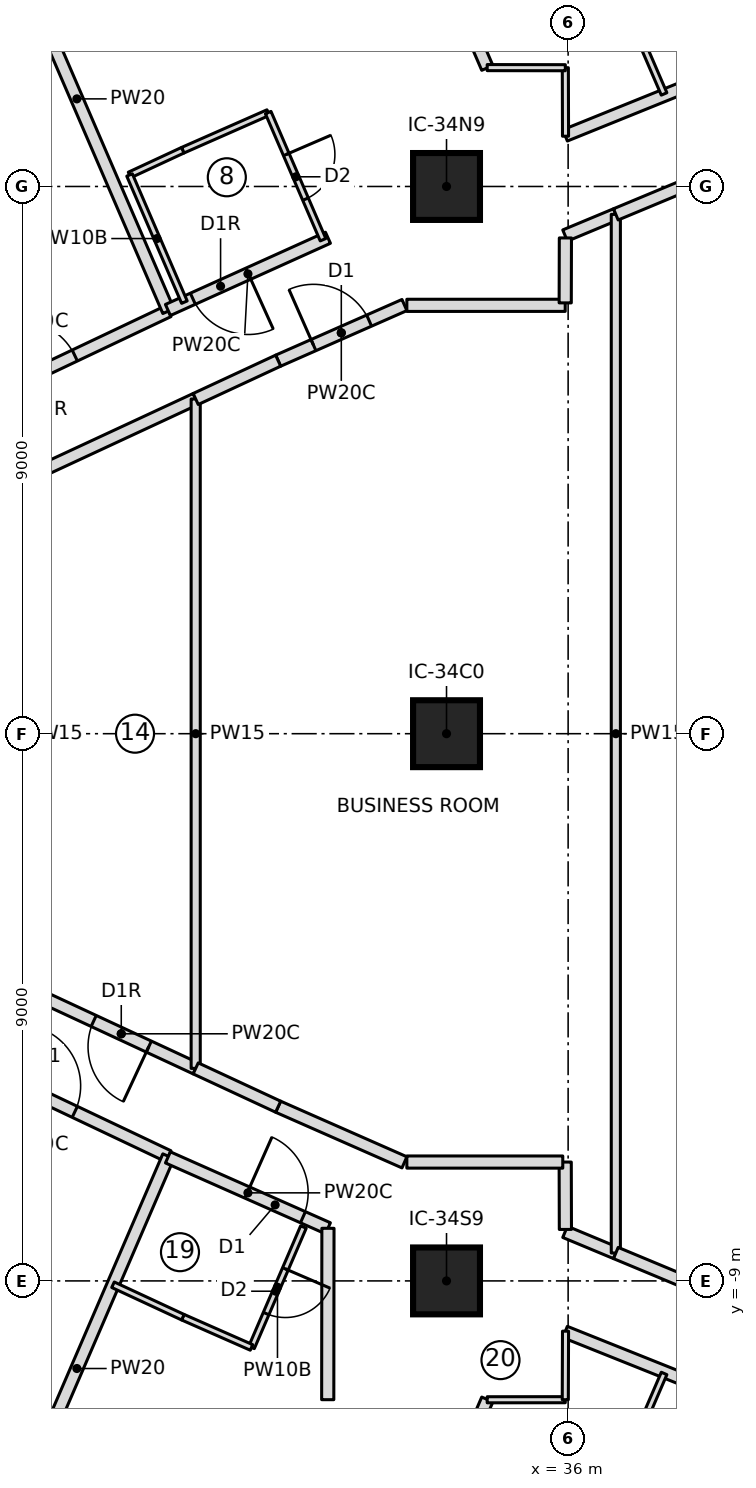
"""IFC4 building model, lengths in metres.
Left out: names, types, materials, properties, quantities, classifications, styles, units other than length and angle.
Written with IfcOpenShell. Run it as: python <this file> out.ifc"""

import sys

from ifc_helpers import new_model, si_unit, direction, frame, frame_2d, origin, origin_2d, place, context, subcontext, project, spatial, rectangle, extrude, element, fill, save


model = new_model("IFC4")
c1 = context("Model", 3, precision=1e-05, world=origin(), true_north=direction((0.0, 1.0)))
c2 = subcontext(c1, "Body", "Model", "MODEL_VIEW")
j1 = project(units=[si_unit("LENGTHUNIT", "METRE"), si_unit("PLANEANGLEUNIT", "RADIAN")], contexts=[c1])
p1 = place(None, origin())
s1 = spatial("IfcSite", under=j1, at=p1, CompositionType="ELEMENT")
p2 = place(p1, origin())
s2 = spatial("IfcBuilding", under=s1, at=p2, CompositionType="ELEMENT")
p3 = place(p2, frame((0.0, 0.0, 151.5)))
s3 = spatial("IfcBuildingStorey", under=s2, at=p3, CompositionType="ELEMENT", Elevation=151.5)
for number, where, z_axis, x_axis in (
    (1, (34.0, -9.0, 0.0), (0.0, 0.0, 1.0), (1.0, 0.0, 0.0)),
    (2, (34.0, 0.0, 0.0), (0.0, 0.0, 1.0), (1.0, 0.0, 0.0)),
    (3, (34.0, 9.0, 0.0), (0.0, 0.0, 1.0), (1.0, 0.0, 0.0)),
):
    element("IfcColumn", number, at=place(p3, frame(where, z_axis=z_axis, x_axis=x_axis)), inside=s3, PredefinedType="COLUMN", context=c2, shape_type="SweptSolid", body=[
        extrude(rectangle(XDim=1.1, YDim=1.1, at=origin_2d()), origin(), (0.0, 0.0, 1.0), 3.55),
    ])
p4 = place(p3, frame((23.64, 4.205, 0.0), z_axis=(0.0, 0.0, 1.0), x_axis=(0.90349162151, 0.428605751082, 0.0)))
e4 = element("IfcWall", 4, at=p4, inside=s3, PredefinedType="PARTITIONING", context=c2, shape_type="SweptSolid", body=[
    extrude(rectangle(XDim=6.404, YDim=0.2, at=frame_2d((3.202, 0.0))), origin(), (0.0, 0.0, 1.0), 3.25),
])
p5 = place(p4, frame((3.7, 0.0, 0.0)))
e5 = element("IfcOpeningElement", 5, at=p5, cuts=e4, PredefinedType="OPENING", context=c2, shape_type="SweptSolid", body=[
    extrude(rectangle(XDim=1.0, YDim=2.1, at=frame_2d((0.5, 1.05))), frame((0.0, 0.11, 0.0), z_axis=(0.0, -1.0, 0.0), x_axis=(1.0, 0.0, 0.0)), (0.0, 0.0, 1.0), 0.22),
])
p6 = place(p3, frame((29.426, 6.95, 0.0), z_axis=(0.0, 0.0, 1.0), x_axis=(-0.396007233012, 0.918247391176, 0.0)))
e6 = element("IfcWall", 6, at=p6, inside=s3, PredefinedType="PARTITIONING", context=c2, shape_type="SweptSolid", body=[
    extrude(rectangle(XDim=7.603, YDim=0.2, at=frame_2d((3.801, 0.0))), origin(), (0.0, 0.0, 1.0), 3.25),
])
p7 = place(p3, frame((32.05, 8.157, 0.0), z_axis=(0.0, 0.0, 1.0), x_axis=(-0.9114145851, -0.411489312215, 0.0)))
e7 = element("IfcWall", 7, at=p7, inside=s3, PredefinedType="PARTITIONING", context=c2, shape_type="SweptSolid", body=[
    extrude(rectangle(XDim=2.888, YDim=0.2, at=frame_2d((1.444, 0.0))), origin(), (0.0, 0.0, 1.0), 3.25),
])
p8 = place(p7, frame((1.438, 0.0, 0.0)))
e8 = element("IfcOpeningElement", 8, at=p8, cuts=e7, PredefinedType="OPENING", context=c2, shape_type="SweptSolid", body=[
    extrude(rectangle(XDim=1.0, YDim=2.1, at=frame_2d((0.5, 1.05))), frame((0.0, 0.11, 0.0), z_axis=(0.0, -1.0, 0.0), x_axis=(1.0, 0.0, 0.0)), (0.0, 0.0, 1.0), 0.22),
])
p9 = place(p3, frame((28.787, 9.189, 0.0), z_axis=(0.0, 0.0, 1.0), x_axis=(0.906840099005, 0.421474832982, 0.0)))
e9 = element("IfcWall", 9, at=p9, inside=s3, PredefinedType="PARTITIONING", context=c2, shape_type="SweptSolid", body=[
    extrude(rectangle(XDim=0.967, YDim=0.1, at=frame_2d((0.483, 0.0))), origin(), (0.0, 0.0, 1.0), 3.25),
])
p10 = place(p3, frame((29.664, 9.597, 0.0), z_axis=(0.0, 0.0, 1.0), x_axis=(0.915061287592, 0.403314814942, 0.0)))
e10 = element("IfcWall", 10, at=p10, inside=s3, PredefinedType="PARTITIONING", context=c2, shape_type="SweptSolid", body=[
    extrude(rectangle(XDim=1.533, YDim=0.1, at=frame_2d((0.767, 0.0))), origin(), (0.0, 0.0, 1.0), 3.25),
])
p11 = place(p3, frame((31.067, 10.215, 0.0), z_axis=(0.0, 0.0, 1.0), x_axis=(0.395975890988, -0.918260907235, 0.0)))
e11 = element("IfcWall", 11, at=p11, inside=s3, PredefinedType="PARTITIONING", context=c2, shape_type="SweptSolid", body=[
    extrude(rectangle(XDim=2.277, YDim=0.1, at=frame_2d((1.138, 0.0))), origin(), (0.0, 0.0, 1.0), 3.25),
])
p12 = place(p11, frame((0.75, 0.0, 0.0)))
e12 = element("IfcOpeningElement", 12, at=p12, cuts=e11, PredefinedType="OPENING", context=c2, shape_type="SweptSolid", body=[
    extrude(rectangle(XDim=0.8, YDim=2.1, at=frame_2d((0.4, 1.05))), frame((0.0, 0.06, 0.0), z_axis=(0.0, -1.0, 0.0), x_axis=(1.0, 0.0, 0.0)), (0.0, 0.0, 1.0), 0.12),
])
p13 = place(p3, frame((29.689, 7.098, 0.0), z_axis=(0.0, 0.0, 1.0), x_axis=(-0.395910380035, 0.918289154341, 0.0)))
e13 = element("IfcWall", 13, at=p13, inside=s3, PredefinedType="PARTITIONING", context=c2, shape_type="SweptSolid", body=[
    extrude(rectangle(XDim=2.278, YDim=0.1, at=frame_2d((1.139, 0.0))), origin(), (0.0, 0.0, 1.0), 3.25),
])
p14 = place(p3, frame((34.671, 10.95, 0.0), z_axis=(0.0, 0.0, 1.0), x_axis=(-0.395978622303, 0.918259729422, 0.0)))
e14 = element("IfcWall", 14, at=p14, inside=s3, PredefinedType="PARTITIONING", context=c2, shape_type="SweptSolid", body=[
    extrude(rectangle(XDim=6.064, YDim=0.2, at=frame_2d((3.032, 0.0))), origin(), (0.0, 0.0, 1.0), 3.25),
])
p15 = place(p3, frame((41.204, 11.964, 0.0), z_axis=(0.0, 0.0, 1.0), x_axis=(-0.927127583339, -0.374745839485, 0.0)))
e15 = element("IfcWall", 15, at=p15, inside=s3, PredefinedType="PARTITIONING", context=c2, shape_type="SweptSolid", body=[
    extrude(rectangle(XDim=5.667, YDim=0.2, at=frame_2d((2.833, 0.0))), origin(), (0.0, 0.0, 1.0), 3.25),
])
p16 = place(p15, frame((0.35, 0.0, 0.0)))
e16 = element("IfcOpeningElement", 16, at=p16, cuts=e15, PredefinedType="OPENING", context=c2, shape_type="SweptSolid", body=[
    extrude(rectangle(XDim=1.0, YDim=2.1, at=frame_2d((0.5, 1.05))), frame((0.0, 0.11, 0.0), z_axis=(0.0, -1.0, 0.0), x_axis=(1.0, 0.0, 0.0)), (0.0, 0.0, 1.0), 0.22),
])
p17 = place(p3, frame((36.677, 12.613, 0.0), z_axis=(0.0, 0.0, 1.0), x_axis=(0.395975890988, -0.918260907235, 0.0)))
e17 = element("IfcWall", 17, at=p17, inside=s3, PredefinedType="PARTITIONING", context=c2, shape_type="SweptSolid", body=[
    extrude(rectangle(XDim=2.277, YDim=0.1, at=frame_2d((1.138, 0.0))), origin(), (0.0, 0.0, 1.0), 3.25),
])
p18 = place(p3, frame((23.64, -4.205, 0.0), z_axis=(0.0, 0.0, 1.0), x_axis=(0.90349162151, -0.428605751082, 0.0)))
e18 = element("IfcWall", 18, at=p18, inside=s3, PredefinedType="PARTITIONING", context=c2, shape_type="SweptSolid", body=[
    extrude(rectangle(XDim=6.404, YDim=0.2, at=frame_2d((3.202, 0.0))), origin(), (0.0, 0.0, 1.0), 3.25),
])
p19 = place(p18, frame((3.7, 0.0, 0.0)))
e19 = element("IfcOpeningElement", 19, at=p19, cuts=e18, PredefinedType="OPENING", context=c2, shape_type="SweptSolid", body=[
    extrude(rectangle(XDim=1.0, YDim=2.1, at=frame_2d((0.5, 1.05))), frame((0.0, 0.11, 0.0), z_axis=(0.0, -1.0, 0.0), x_axis=(1.0, 0.0, 0.0)), (0.0, 0.0, 1.0), 0.22),
])
p20 = place(p3, frame((26.416, -13.931, 0.0), z_axis=(0.0, 0.0, 1.0), x_axis=(0.396007233012, 0.918247391176, 0.0)))
e20 = element("IfcWall", 20, at=p20, inside=s3, PredefinedType="PARTITIONING", context=c2, shape_type="SweptSolid", body=[
    extrude(rectangle(XDim=7.603, YDim=0.2, at=frame_2d((3.801, 0.0))), origin(), (0.0, 0.0, 1.0), 3.25),
])
p21 = place(p3, frame((29.418, -6.969, 0.0), z_axis=(0.0, 0.0, 1.0), x_axis=(0.914223747947, -0.405209746539, 0.0)))
e21 = element("IfcWall", 21, at=p21, inside=s3, PredefinedType="PARTITIONING", context=c2, shape_type="SweptSolid", body=[
    extrude(rectangle(XDim=2.879, YDim=0.2, at=frame_2d((1.439, 0.0))), origin(), (0.0, 0.0, 1.0), 3.25),
])
p22 = place(p21, frame((1.429, 0.0, 0.0)))
e22 = element("IfcOpeningElement", 22, at=p22, cuts=e21, PredefinedType="OPENING", context=c2, shape_type="SweptSolid", body=[
    extrude(rectangle(XDim=1.0, YDim=2.1, at=frame_2d((0.5, 1.05))), frame((0.0, 0.11, 0.0), z_axis=(0.0, -1.0, 0.0), x_axis=(1.0, 0.0, 0.0)), (0.0, 0.0, 1.0), 0.22),
])
p23 = place(p3, frame((31.647, -8.114, 0.0), z_axis=(0.0, 0.0, 1.0), x_axis=(-0.395926443446, -0.91828222861, 0.0)))
e23 = element("IfcWall", 23, at=p23, inside=s3, PredefinedType="PARTITIONING", context=c2, shape_type="SweptSolid", body=[
    extrude(rectangle(XDim=2.157, YDim=0.1, at=frame_2d((1.079, 0.0))), origin(), (0.0, 0.0, 1.0), 3.25),
])
p24 = place(p23, frame((0.75, 0.0, 0.0)))
e24 = element("IfcOpeningElement", 24, at=p24, cuts=e23, PredefinedType="OPENING", context=c2, shape_type="SweptSolid", body=[
    extrude(rectangle(XDim=0.8, YDim=2.1, at=frame_2d((0.4, 1.05))), frame((0.0, 0.06, 0.0), z_axis=(0.0, -1.0, 0.0), x_axis=(1.0, 0.0, 0.0)), (0.0, 0.0, 1.0), 0.12),
])
p25 = place(p3, frame((30.793, -10.094, 0.0), z_axis=(0.0, 0.0, 1.0), x_axis=(-0.915072564462, 0.403289228431, 0.0)))
e25 = element("IfcWall", 25, at=p25, inside=s3, PredefinedType="PARTITIONING", context=c2, shape_type="SweptSolid", body=[
    extrude(rectangle(XDim=1.233, YDim=0.1, at=frame_2d((0.617, 0.0))), origin(), (0.0, 0.0, 1.0), 3.25),
])
p26 = place(p3, frame((29.664, -9.597, 0.0), z_axis=(0.0, 0.0, 1.0), x_axis=(-0.906856445091, 0.421439661159, 0.0)))
e26 = element("IfcWall", 26, at=p26, inside=s3, PredefinedType="PARTITIONING", context=c2, shape_type="SweptSolid", body=[
    extrude(rectangle(XDim=1.267, YDim=0.1, at=frame_2d((0.633, 0.0))), origin(), (0.0, 0.0, 1.0), 3.25),
])
p27 = place(p3, frame((32.27, -16.518, 0.0), z_axis=(0.0, 0.0, 1.0), x_axis=(0.395978622303, 0.918259729422, 0.0)))
e27 = element("IfcWall", 27, at=p27, inside=s3, PredefinedType="PARTITIONING", context=c2, shape_type="SweptSolid", body=[
    extrude(rectangle(XDim=6.064, YDim=0.2, at=frame_2d((3.032, 0.0))), origin(), (0.0, 0.0, 1.0), 3.25),
])
p28 = place(p3, frame((35.95, -9.84, 0.0), z_axis=(0.0, 0.0, 1.0), x_axis=(0.92844400648, -0.371472376943, 0.0)))
e28 = element("IfcWall", 28, at=p28, inside=s3, PredefinedType="PARTITIONING", context=c2, shape_type="SweptSolid", body=[
    extrude(rectangle(XDim=5.667, YDim=0.2, at=frame_2d((2.833, 0.0))), origin(), (0.0, 0.0, 1.0), 3.25),
])
p29 = place(p28, frame((2.25, 0.0, 0.0)))
e29 = element("IfcOpeningElement", 29, at=p29, cuts=e28, PredefinedType="OPENING", context=c2, shape_type="SweptSolid", body=[
    extrude(rectangle(XDim=1.0, YDim=2.1, at=frame_2d((0.5, 1.05))), frame((0.0, 0.11, 0.0), z_axis=(0.0, -1.0, 0.0), x_axis=(1.0, 0.0, 0.0)), (0.0, 0.0, 1.0), 0.22),
])
p30 = place(p3, frame((37.578, -10.522, 0.0), z_axis=(0.0, 0.0, 1.0), x_axis=(-0.395975890988, -0.918260907235, 0.0)))
e30 = element("IfcWall", 30, at=p30, inside=s3, PredefinedType="PARTITIONING", context=c2, shape_type="SweptSolid", body=[
    extrude(rectangle(XDim=2.277, YDim=0.1, at=frame_2d((1.138, 0.0))), origin(), (0.0, 0.0, 1.0), 3.25),
])
p31 = place(p3, frame((29.875, -5.505, 0.0), z_axis=(0.0, 0.0, 1.0), x_axis=(-0.906831253463, 0.421493864419, 0.0)))
e31 = element("IfcWall", 31, at=p31, inside=s3, PredefinedType="PARTITIONING", context=c2, shape_type="SweptSolid", body=[
    extrude(rectangle(XDim=2.7, YDim=0.2, at=frame_2d((1.35, 0.0))), origin(), (0.0, 0.0, 1.0), 3.25),
])
p32 = place(p31, frame((0.85, 0.0, 0.0)))
e32 = element("IfcOpeningElement", 32, at=p32, cuts=e31, PredefinedType="OPENING", context=c2, shape_type="SweptSolid", body=[
    extrude(rectangle(XDim=1.0, YDim=2.1, at=frame_2d((0.5, 1.05))), frame((0.0, 0.11, 0.0), z_axis=(0.0, -1.0, 0.0), x_axis=(1.0, 0.0, 0.0)), (0.0, 0.0, 1.0), 0.22),
])
p33 = place(p3, frame((27.427, 4.367, 0.0), z_axis=(0.0, 0.0, 1.0), x_axis=(0.906831253463, 0.421493864419, 0.0)))
e33 = element("IfcWall", 33, at=p33, inside=s3, PredefinedType="PARTITIONING", context=c2, shape_type="SweptSolid", body=[
    extrude(rectangle(XDim=2.7, YDim=0.2, at=frame_2d((1.35, 0.0))), origin(), (0.0, 0.0, 1.0), 3.25),
])
p34 = place(p3, frame((29.875, -5.505, 0.0), z_axis=(0.0, 0.0, 1.0), x_axis=(0.0, 1.0, 0.0)))
e34 = element("IfcWall", 34, at=p34, inside=s3, PredefinedType="PARTITIONING", context=c2, shape_type="SweptSolid", body=[
    extrude(rectangle(XDim=11.009, YDim=0.15, at=frame_2d((5.505, 0.0))), origin(), (0.0, 0.0, 1.0), 3.25),
])
p35 = place(p3, frame((31.231, 6.135, 0.0), z_axis=(0.0, 0.0, 1.0), x_axis=(0.915102334452, 0.403221672881, 0.0)))
e35 = element("IfcWall", 35, at=p35, inside=s3, PredefinedType="PARTITIONING", context=c2, shape_type="SweptSolid", body=[
    extrude(rectangle(XDim=2.269, YDim=0.2, at=frame_2d((1.135, 0.0))), origin(), (0.0, 0.0, 1.0), 3.25),
])
p36 = place(p35, frame((0.635, 0.0, 0.0)))
e36 = element("IfcOpeningElement", 36, at=p36, cuts=e35, PredefinedType="OPENING", context=c2, shape_type="SweptSolid", body=[
    extrude(rectangle(XDim=1.0, YDim=2.1, at=frame_2d((0.5, 1.05))), frame((0.0, 0.11, 0.0), z_axis=(0.0, -1.0, 0.0), x_axis=(1.0, 0.0, 0.0)), (0.0, 0.0, 1.0), 0.22),
])
for number, where, z_axis, x_axis in (
    (37, (35.95, 8.193, 0.0), (0.0, 0.0, 1.0), (0.923, 0.385, 0.0)),
    (38, (36.784, -8.541, 0.0), (0.0, 0.0, 1.0), (-0.923, 0.385, 0.0)),
):
    element("IfcWall", number, at=place(p3, frame(where, z_axis=z_axis, x_axis=x_axis)), inside=s3, PredefinedType="PARTITIONING", context=c2, shape_type="SweptSolid", body=[
        extrude(rectangle(XDim=0.904, YDim=0.2, at=frame_2d((0.452, 0.0))), origin(), (0.0, 0.0, 1.0), 3.25),
    ])
p37 = place(p3, frame((33.308, -7.05, 0.0), z_axis=(0.0, 0.0, 1.0), x_axis=(-0.915102334452, 0.403221672881, 0.0)))
e39 = element("IfcWall", 39, at=p37, inside=s3, PredefinedType="PARTITIONING", context=c2, shape_type="SweptSolid", body=[
    extrude(rectangle(XDim=2.269, YDim=0.2, at=frame_2d((1.135, 0.0))), origin(), (0.0, 0.0, 1.0), 3.25),
])
for number, where, z_axis, x_axis in (
    (40, (31.231, -6.135, 0.0), (0.0, 0.0, 1.0), (-0.907, 0.421, 0.0)),
    (41, (29.875, 5.505, 0.0), (0.0, 0.0, 1.0), (0.907, 0.421, 0.0)),
):
    element("IfcWall", number, at=place(p3, frame(where, z_axis=z_axis, x_axis=x_axis)), inside=s3, PredefinedType="PARTITIONING", context=c2, shape_type="SweptSolid", body=[
        extrude(rectangle(XDim=1.496, YDim=0.2, at=frame_2d((0.748, 0.0))), origin(), (0.0, 0.0, 1.0), 3.25),
    ])
p38 = place(p3, frame((36.784, -8.541, 0.0), z_axis=(0.0, 0.0, 1.0), x_axis=(0.0, 1.0, 0.0)))
e42 = element("IfcWall", 42, at=p38, inside=s3, PredefinedType="PARTITIONING", context=c2, shape_type="SweptSolid", body=[
    extrude(rectangle(XDim=17.082, YDim=0.15, at=frame_2d((8.541, 0.0))), origin(), (0.0, 0.0, 1.0), 3.25),
])
for number, where, z_axis, x_axis in (
    (43, (38.943, -9.441, 0.0), (0.0, 0.0, 1.0), (-0.923, 0.385, 0.0)),
    (44, (36.784, 8.541, 0.0), (0.0, 0.0, 1.0), (0.923, 0.385, 0.0)),
):
    element("IfcWall", number, at=place(p3, frame(where, z_axis=z_axis, x_axis=x_axis)), inside=s3, PredefinedType="PARTITIONING", context=c2, shape_type="SweptSolid", body=[
        extrude(rectangle(XDim=2.339, YDim=0.2, at=frame_2d((1.169, 0.0))), origin(), (0.0, 0.0, 1.0), 3.25),
    ])
p39 = place(p3, frame((35.957, 9.827, 0.0), z_axis=(0.0, 0.0, 1.0), x_axis=(-0.002817500737, 0.999996030837, 0.0)))
e45 = element("IfcWall", 45, at=p39, inside=s3, PredefinedType="PARTITIONING", context=c2, shape_type="SweptSolid", body=[
    extrude(rectangle(XDim=1.126, YDim=0.1, at=frame_2d((0.563, 0.0))), origin(), (0.0, 0.0, 1.0), 3.25),
])
p40 = place(p3, frame((35.954, 10.953, 0.0), z_axis=(0.0, 0.0, 1.0), x_axis=(-0.999998845172, 0.001519755084, 0.0)))
e46 = element("IfcWall", 46, at=p40, inside=s3, PredefinedType="PARTITIONING", context=c2, shape_type="SweptSolid", body=[
    extrude(rectangle(XDim=1.285, YDim=0.1, at=frame_2d((0.643, 0.0))), origin(), (0.0, 0.0, 1.0), 3.25),
])
p41 = place(p3, frame((34.669, -10.955, 0.0), z_axis=(0.0, 0.0, 1.0), x_axis=(0.99999954838, 0.000950389231, 0.0)))
e47 = element("IfcWall", 47, at=p41, inside=s3, PredefinedType="PARTITIONING", context=c2, shape_type="SweptSolid", body=[
    extrude(rectangle(XDim=1.284, YDim=0.1, at=frame_2d((0.642, 0.0))), origin(), (0.0, 0.0, 1.0), 3.25),
])
p42 = place(p3, frame((35.953, -10.954, 0.0), z_axis=(0.0, 0.0, 1.0), x_axis=(0.003465432949, 0.999993995369, 0.0)))
e48 = element("IfcWall", 48, at=p42, inside=s3, PredefinedType="PARTITIONING", context=c2, shape_type="SweptSolid", body=[
    extrude(rectangle(XDim=1.127, YDim=0.1, at=frame_2d((0.563, 0.0))), origin(), (0.0, 0.0, 1.0), 3.25),
])
p43 = place(p3, frame((35.955, -8.154, 0.0), z_axis=(0.0, 0.0, 1.0), x_axis=(-0.002643744892, 0.9999965053, 0.0)))
e49 = element("IfcWall", 49, at=p43, inside=s3, PredefinedType="PARTITIONING", context=c2, shape_type="SweptSolid", body=[
    extrude(rectangle(XDim=1.108, YDim=0.2, at=frame_2d((0.554, 0.0))), origin(), (0.0, 0.0, 1.0), 3.25),
])
p44 = place(p3, frame((35.912, -7.045, 0.0), z_axis=(0.0, 0.0, 1.0), x_axis=(-0.999999981873, 0.000190403652, 0.0)))
e50 = element("IfcWall", 50, at=p44, inside=s3, PredefinedType="PARTITIONING", context=c2, shape_type="SweptSolid", body=[
    extrude(rectangle(XDim=2.564, YDim=0.2, at=frame_2d((1.282, 0.0))), origin(), (0.0, 0.0, 1.0), 3.25),
])
p45 = place(p3, frame((33.347, 7.045, 0.0), z_axis=(0.0, 0.0, 1.0), x_axis=(0.999999982426, 0.000187476562, 0.0)))
e51 = element("IfcWall", 51, at=p45, inside=s3, PredefinedType="PARTITIONING", context=c2, shape_type="SweptSolid", body=[
    extrude(rectangle(XDim=2.604, YDim=0.2, at=frame_2d((1.302, 0.0))), origin(), (0.0, 0.0, 1.0), 3.25),
])
p46 = place(p3, frame((35.952, 7.085, 0.0), z_axis=(0.0, 0.0, 1.0), x_axis=(0.002742846825, 0.999996238389, 0.0)))
e52 = element("IfcWall", 52, at=p46, inside=s3, PredefinedType="PARTITIONING", context=c2, shape_type="SweptSolid", body=[
    extrude(rectangle(XDim=1.068, YDim=0.2, at=frame_2d((0.534, 0.0))), origin(), (0.0, 0.0, 1.0), 3.25),
])
p47 = place(p3, frame((32.05, -8.135, 0.0), z_axis=(0.0, 0.0, 1.0), x_axis=(-0.001299262654, -0.999999155958, 0.0)))
e53 = element("IfcWall", 53, at=p47, inside=s3, PredefinedType="PARTITIONING", context=c2, shape_type="SweptSolid", body=[
    extrude(rectangle(XDim=2.819, YDim=0.2, at=frame_2d((1.409, 0.0))), origin(), (0.0, 0.0, 1.0), 3.25),
])
p48 = place(p5, origin())
e54 = element("IfcDoor", 54, at=p48, inside=s3, OperationType="SINGLE_SWING_RIGHT", PredefinedType="DOOR", context=c2, shape_type="SweptSolid", body=[
    extrude(rectangle(XDim=1.0, YDim=2.1, at=frame_2d((0.5, 1.05))), frame((0.0, 0.025, 0.0), z_axis=(0.0, -1.0, 0.0), x_axis=(1.0, 0.0, 0.0)), (0.0, 0.0, 1.0), 0.05),
])
fill(e5, e54)
p49 = place(p12, origin())
e55 = element("IfcDoor", 55, at=p49, inside=s3, OperationType="SINGLE_SWING_LEFT", PredefinedType="DOOR", context=c2, shape_type="SweptSolid", body=[
    extrude(rectangle(XDim=0.8, YDim=2.1, at=frame_2d((0.4, 1.05))), frame((0.0, 0.025, 0.0), z_axis=(0.0, -1.0, 0.0), x_axis=(1.0, 0.0, 0.0)), (0.0, 0.0, 1.0), 0.05),
])
fill(e12, e55)
p50 = place(p8, origin())
e56 = element("IfcDoor", 56, at=p50, inside=s3, OperationType="SINGLE_SWING_RIGHT", PredefinedType="DOOR", context=c2, shape_type="SweptSolid", body=[
    extrude(rectangle(XDim=1.0, YDim=2.1, at=frame_2d((0.5, 1.05))), frame((0.0, 0.025, 0.0), z_axis=(0.0, -1.0, 0.0), x_axis=(1.0, 0.0, 0.0)), (0.0, 0.0, 1.0), 0.05),
])
fill(e8, e56)
p51 = place(p19, origin())
e57 = element("IfcDoor", 57, at=p51, inside=s3, OperationType="SINGLE_SWING_LEFT", PredefinedType="DOOR", context=c2, shape_type="SweptSolid", body=[
    extrude(rectangle(XDim=1.0, YDim=2.1, at=frame_2d((0.5, 1.05))), frame((0.0, 0.025, 0.0), z_axis=(0.0, -1.0, 0.0), x_axis=(1.0, 0.0, 0.0)), (0.0, 0.0, 1.0), 0.05),
])
fill(e19, e57)
p52 = place(p24, origin())
e58 = element("IfcDoor", 58, at=p52, inside=s3, OperationType="SINGLE_SWING_LEFT", PredefinedType="DOOR", context=c2, shape_type="SweptSolid", body=[
    extrude(rectangle(XDim=0.8, YDim=2.1, at=frame_2d((0.4, 1.05))), frame((0.0, 0.025, 0.0), z_axis=(0.0, -1.0, 0.0), x_axis=(1.0, 0.0, 0.0)), (0.0, 0.0, 1.0), 0.05),
])
fill(e24, e58)
p53 = place(p22, origin())
e59 = element("IfcDoor", 59, at=p53, inside=s3, OperationType="SINGLE_SWING_LEFT", PredefinedType="DOOR", context=c2, shape_type="SweptSolid", body=[
    extrude(rectangle(XDim=1.0, YDim=2.1, at=frame_2d((0.5, 1.05))), frame((0.0, 0.025, 0.0), z_axis=(0.0, -1.0, 0.0), x_axis=(1.0, 0.0, 0.0)), (0.0, 0.0, 1.0), 0.05),
])
fill(e22, e59)
p54 = place(p32, origin())
e60 = element("IfcDoor", 60, at=p54, inside=s3, OperationType="SINGLE_SWING_RIGHT", PredefinedType="DOOR", context=c2, shape_type="SweptSolid", body=[
    extrude(rectangle(XDim=1.0, YDim=2.1, at=frame_2d((0.5, 1.05))), frame((0.0, 0.025, 0.0), z_axis=(0.0, -1.0, 0.0), x_axis=(1.0, 0.0, 0.0)), (0.0, 0.0, 1.0), 0.05),
])
fill(e32, e60)
p55 = place(p36, origin())
e61 = element("IfcDoor", 61, at=p55, inside=s3, OperationType="SINGLE_SWING_LEFT", PredefinedType="DOOR", context=c2, shape_type="SweptSolid", body=[
    extrude(rectangle(XDim=1.0, YDim=2.1, at=frame_2d((0.5, 1.05))), frame((0.0, 0.025, 0.0), z_axis=(0.0, -1.0, 0.0), x_axis=(1.0, 0.0, 0.0)), (0.0, 0.0, 1.0), 0.05),
])
fill(e36, e61)
save(model, sys.argv[1])
